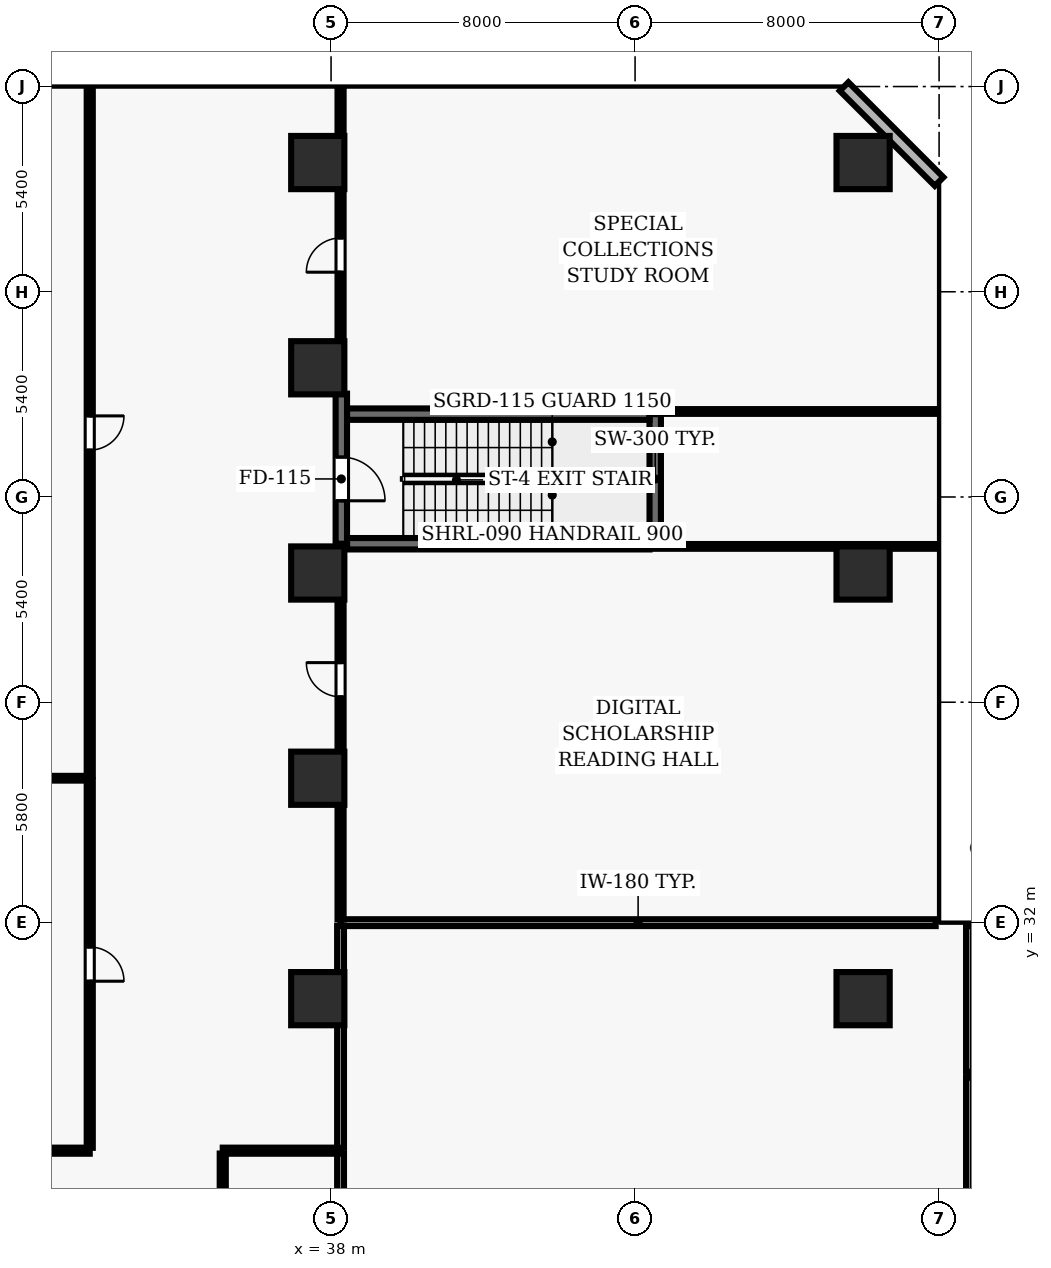
"""IFC4 building model, lengths in metres.
Left out: names, types, materials, properties, quantities, classifications, styles, units other than length and angle.
Written with IfcOpenShell. Run it as: python <this file> out.ifc"""

import sys

from ifc_helpers import new_model, si_unit, direction, frame, frame_2d, origin, origin_2d, place, context, subcontext, project, spatial, rectangle, extrude, element, fill, save


model = new_model("IFC4")
c1 = context("Model", 3, precision=1e-05, world=origin(), true_north=direction((0.0, 1.0)))
c2 = subcontext(c1, "Body", "Model", "MODEL_VIEW")
j1 = project(units=[si_unit("LENGTHUNIT", "METRE"), si_unit("PLANEANGLEUNIT", "RADIAN")], contexts=[c1])
p1 = place(None, origin())
s1 = spatial("IfcSite", under=j1, at=p1, CompositionType="ELEMENT")
p2 = place(p1, origin())
s2 = spatial("IfcBuilding", under=s1, at=p2, CompositionType="ELEMENT")
p3 = place(p2, frame((0.0, 0.0, 5.2)))
s3 = spatial("IfcBuildingStorey", under=s2, at=p3, CompositionType="ELEMENT", Elevation=5.2)
for number, where, z_axis, x_axis in (
    (1, (37.65, 30.0, 0.0), (0.0, 0.0, 1.0), (1.0, 0.0, 0.0)),
    (2, (37.65, 35.8, 0.0), (0.0, 0.0, 1.0), (1.0, 0.0, 0.0)),
    (3, (37.65, 41.2, 0.0), (0.0, 0.0, 1.0), (1.0, 0.0, 0.0)),
    (4, (37.65, 46.6, 0.0), (0.0, 0.0, 1.0), (1.0, 0.0, 0.0)),
    (5, (37.65, 52.0, 0.0), (0.0, 0.0, 1.0), (1.0, 0.0, 0.0)),
    (6, (52.0, 30.0, 0.0), (0.0, 0.0, 1.0), (1.0, 0.0, 0.0)),
    (7, (52.0, 41.2, 0.0), (0.0, 0.0, 1.0), (1.0, 0.0, 0.0)),
    (8, (52.0, 52.0, 0.0), (0.0, 0.0, 1.0), (1.0, 0.0, 0.0)),
):
    element("IfcColumn", number, at=place(p3, frame(where, z_axis=z_axis, x_axis=x_axis)), inside=s3, PredefinedType="COLUMN", context=c2, shape_type="SweptSolid", body=[
        extrude(rectangle(XDim=1.4, YDim=1.4, at=origin_2d()), origin(), (0.0, 0.0, 1.0), 5.2),
    ])
p4 = place(p3, frame((54.0, 51.5, 0.0), z_axis=(0.0, 0.0, 1.0), x_axis=(-0.707106781187, 0.707106781187, 0.0)))
e9 = element("IfcWall", 9, at=p4, inside=s3, PredefinedType="SOLIDWALL", context=c2, shape_type="SweptSolid", body=[
    extrude(rectangle(XDim=3.536, YDim=0.32, at=frame_2d((1.768, 0.0))), origin(), (0.0, 0.0, 1.0), 4.92),
])
p5 = place(p3, frame((38.42, 41.97, 0.0), z_axis=(0.0, 0.0, 1.0), x_axis=(1.0, 0.0, 0.0)))
e10 = element("IfcWall", 10, at=p5, inside=s3, PredefinedType="SHEAR", context=c2, shape_type="SweptSolid", body=[
    extrude(rectangle(XDim=7.96, YDim=0.3, at=frame_2d((3.98, 0.0))), origin(), (0.0, 0.0, 1.0), 4.92),
])
p6 = place(p3, frame((46.53, 41.97, 0.0), z_axis=(0.0, 0.0, 1.0), x_axis=(0.0, 1.0, 0.0)))
e11 = element("IfcWall", 11, at=p6, inside=s3, PredefinedType="SHEAR", context=c2, shape_type="SweptSolid", body=[
    extrude(rectangle(XDim=3.41, YDim=0.3, at=frame_2d((1.705, 0.0))), origin(), (0.0, 0.0, 1.0), 4.92),
])
p7 = place(p3, frame((46.38, 45.38, 0.0), z_axis=(0.0, 0.0, 1.0), x_axis=(-1.0, 0.0, 0.0)))
e12 = element("IfcWall", 12, at=p7, inside=s3, PredefinedType="SHEAR", context=c2, shape_type="SweptSolid", body=[
    extrude(rectangle(XDim=7.96, YDim=0.3, at=frame_2d((3.98, 0.0))), origin(), (0.0, 0.0, 1.0), 4.92),
])
p8 = place(p3, frame((38.27, 45.92, 0.0), z_axis=(0.0, 0.0, 1.0), x_axis=(0.0, -1.0, 0.0)))
e13 = element("IfcWall", 13, at=p8, inside=s3, PredefinedType="SHEAR", context=c2, shape_type="SweptSolid", body=[
    extrude(rectangle(XDim=3.95, YDim=0.3, at=frame_2d((1.975, 0.0))), origin(), (0.0, 0.0, 1.0), 4.92),
])
p9 = place(p8, frame((1.67, 0.0, 0.0)))
e14 = element("IfcOpeningElement", 14, at=p9, cuts=e13, PredefinedType="OPENING", context=c2, shape_type="SweptSolid", body=[
    extrude(rectangle(XDim=1.15, YDim=2.15, at=frame_2d((0.575, 1.075))), frame((0.0, 0.16, 0.0), z_axis=(0.0, -1.0, 0.0), x_axis=(1.0, 0.0, 0.0)), (0.0, 0.0, 1.0), 0.32),
])
p10 = place(p3, frame((31.65, 26.0, 0.0), z_axis=(0.0, 0.0, 1.0), x_axis=(-1.0, 0.0, 0.0)))
e15 = element("IfcWall", 15, at=p10, inside=s3, PredefinedType="PARTITIONING", context=c2, shape_type="SweptSolid", body=[
    extrude(rectangle(XDim=9.495, YDim=0.16, at=frame_2d((4.748, 0.0))), origin(), (0.0, 0.0, 1.0), 4.92),
])
p11 = place(p3, frame((31.65, 35.8, 0.0), z_axis=(0.0, 0.0, 1.0), x_axis=(-1.0, 0.0, 0.0)))
e16 = element("IfcWall", 16, at=p11, inside=s3, PredefinedType="PARTITIONING", context=c2, shape_type="SweptSolid", body=[
    extrude(rectangle(XDim=9.495, YDim=0.125, at=frame_2d((4.748, 0.0))), origin(), (0.0, 0.0, 1.0), 3.72),
])
p12 = place(p3, frame((35.15, 26.0, 0.0), z_axis=(0.0, 0.0, 1.0), x_axis=(1.0, 0.0, 0.0)))
e17 = element("IfcWall", 17, at=p12, inside=s3, PredefinedType="PARTITIONING", context=c2, shape_type="SweptSolid", body=[
    extrude(rectangle(XDim=3.1, YDim=0.16, at=frame_2d((1.55, 0.0))), origin(), (0.0, 0.0, 1.0), 4.92),
])
p13 = place(p3, frame((38.25, 32.0, 0.0), z_axis=(0.0, 0.0, 1.0), x_axis=(1.0, 0.0, 0.0)))
e18 = element("IfcWall", 18, at=p13, inside=s3, PredefinedType="PARTITIONING", context=c2, shape_type="SweptSolid", body=[
    extrude(rectangle(XDim=15.66, YDim=0.18, at=frame_2d((7.83, 0.0))), origin(), (0.0, 0.0, 1.0), 4.92),
])
for number, where, z_axis, x_axis in (
    (19, (46.38, 45.45, 0.0), (0.0, 0.0, 1.0), (1.0, 0.0, 0.0)),
    (20, (53.91, 41.9, 0.0), (0.0, 0.0, 1.0), (-1.0, 0.0, 0.0)),
):
    element("IfcWall", number, at=place(p3, frame(where, z_axis=z_axis, x_axis=x_axis)), inside=s3, PredefinedType="PARTITIONING", context=c2, shape_type="SweptSolid", body=[
        extrude(rectangle(XDim=7.53, YDim=0.125, at=frame_2d((3.765, 0.0))), origin(), (0.0, 0.0, 1.0), 4.92),
    ])
p14 = place(p3, frame((58.45, 28.0, 0.0), z_axis=(0.0, 0.0, 1.0), x_axis=(-1.0, 0.0, 0.0)))
e21 = element("IfcWall", 21, at=p14, inside=s3, PredefinedType="PARTITIONING", context=c2, shape_type="SweptSolid", body=[
    extrude(rectangle(XDim=3.65, YDim=0.16, at=frame_2d((1.825, 0.0))), origin(), (0.0, 0.0, 1.0), 4.92),
])
p15 = place(p3, frame((31.65, 35.742, 0.0), z_axis=(0.0, 0.0, 1.0), x_axis=(0.0, -1.0, 0.0)))
e22 = element("IfcWall", 22, at=p15, inside=s3, PredefinedType="PARTITIONING", context=c2, shape_type="SweptSolid", body=[
    extrude(rectangle(XDim=9.667, YDim=0.16, at=frame_2d((4.833, 0.0))), origin(), (0.0, 0.0, 1.0), 4.92),
])
p16 = place(p15, frame((4.383, 0.0, 0.0)))
e23 = element("IfcOpeningElement", 23, at=p16, cuts=e22, PredefinedType="OPENING", context=c2, shape_type="SweptSolid", body=[
    extrude(rectangle(XDim=0.9, YDim=2.1, at=frame_2d((0.45, 1.05))), frame((0.0, 0.09, 0.0), z_axis=(0.0, -1.0, 0.0), x_axis=(1.0, 0.0, 0.0)), (0.0, 0.0, 1.0), 0.18),
])
p17 = place(p3, frame((31.65, 53.91, 0.0), z_axis=(0.0, 0.0, 1.0), x_axis=(0.0, -1.0, 0.0)))
e24 = element("IfcWall", 24, at=p17, inside=s3, PredefinedType="PARTITIONING", context=c2, shape_type="SweptSolid", body=[
    extrude(rectangle(XDim=18.053, YDim=0.16, at=frame_2d((9.026, 0.0))), origin(), (0.0, 0.0, 1.0), 4.92),
])
p18 = place(p17, frame((8.576, 0.0, 0.0)))
e25 = element("IfcOpeningElement", 25, at=p18, cuts=e24, PredefinedType="OPENING", context=c2, shape_type="SweptSolid", body=[
    extrude(rectangle(XDim=0.9, YDim=2.1, at=frame_2d((0.45, 1.05))), frame((0.0, 0.09, 0.0), z_axis=(0.0, -1.0, 0.0), x_axis=(1.0, 0.0, 0.0)), (0.0, 0.0, 1.0), 0.18),
])
p19 = place(p3, frame((35.15, 24.07, 0.0), z_axis=(0.0, 0.0, 1.0), x_axis=(0.0, 1.0, 0.0)))
e26 = element("IfcWall", 26, at=p19, inside=s3, PredefinedType="PARTITIONING", context=c2, shape_type="SweptSolid", body=[
    extrude(rectangle(XDim=1.855, YDim=0.16, at=frame_2d((0.927, 0.0))), origin(), (0.0, 0.0, 1.0), 4.92),
])
p20 = place(p3, frame((38.25, 25.925, 0.0), z_axis=(0.0, 0.0, 1.0), x_axis=(0.0, -1.0, 0.0)))
e27 = element("IfcWall", 27, at=p20, inside=s3, PredefinedType="PARTITIONING", context=c2, shape_type="SweptSolid", body=[
    extrude(rectangle(XDim=10.64, YDim=0.18, at=frame_2d((5.32, 0.0))), origin(), (0.0, 0.0, 1.0), 4.92),
])
p21 = place(p3, frame((38.25, 26.075, 0.0), z_axis=(0.0, 0.0, 1.0), x_axis=(0.0, 1.0, 0.0)))
e28 = element("IfcWall", 28, at=p21, inside=s3, PredefinedType="PARTITIONING", context=c2, shape_type="SweptSolid", body=[
    extrude(rectangle(XDim=5.84, YDim=0.18, at=frame_2d((2.92, 0.0))), origin(), (0.0, 0.0, 1.0), 4.92),
])
p22 = place(p3, frame((38.25, 32.085, 0.0), z_axis=(0.0, 0.0, 1.0), x_axis=(0.0, 1.0, 0.0)))
e29 = element("IfcWall", 29, at=p22, inside=s3, PredefinedType="PARTITIONING", context=c2, shape_type="SweptSolid", body=[
    extrude(rectangle(XDim=9.815, YDim=0.16, at=frame_2d((4.907, 0.0))), origin(), (0.0, 0.0, 1.0), 4.92),
])
p23 = place(p22, frame((5.857, 0.0, 0.0)))
e30 = element("IfcOpeningElement", 30, at=p23, cuts=e29, PredefinedType="OPENING", context=c2, shape_type="SweptSolid", body=[
    extrude(rectangle(XDim=0.9, YDim=2.1, at=frame_2d((0.45, 1.05))), frame((0.0, 0.09, 0.0), z_axis=(0.0, -1.0, 0.0), x_axis=(1.0, 0.0, 0.0)), (0.0, 0.0, 1.0), 0.18),
])
p24 = place(p3, frame((38.25, 45.92, 0.0), z_axis=(0.0, 0.0, 1.0), x_axis=(0.0, 1.0, 0.0)))
e31 = element("IfcWall", 31, at=p24, inside=s3, PredefinedType="PARTITIONING", context=c2, shape_type="SweptSolid", body=[
    extrude(rectangle(XDim=7.99, YDim=0.16, at=frame_2d((3.995, 0.0))), origin(), (0.0, 0.0, 1.0), 4.92),
])
p25 = place(p24, frame((3.195, 0.0, 0.0)))
e32 = element("IfcOpeningElement", 32, at=p25, cuts=e31, PredefinedType="OPENING", context=c2, shape_type="SweptSolid", body=[
    extrude(rectangle(XDim=0.9, YDim=2.1, at=frame_2d((0.45, 1.05))), frame((0.0, 0.09, 0.0), z_axis=(0.0, -1.0, 0.0), x_axis=(1.0, 0.0, 0.0)), (0.0, 0.0, 1.0), 0.18),
])
p26 = place(p3, frame((54.8, 28.075, 0.0), z_axis=(0.0, 0.0, 1.0), x_axis=(0.0, 1.0, 0.0)))
e33 = element("IfcWall", 33, at=p26, inside=s3, PredefinedType="PARTITIONING", context=c2, shape_type="SweptSolid", body=[
    extrude(rectangle(XDim=3.835, YDim=0.18, at=frame_2d((1.917, 0.0))), origin(), (0.0, 0.0, 1.0), 4.451),
])
p27 = place(p3, frame((54.8, 27.925, 0.0), z_axis=(0.0, 0.0, 1.0), x_axis=(0.0, -1.0, 0.0)))
e34 = element("IfcWall", 34, at=p27, inside=s3, PredefinedType="PARTITIONING", context=c2, shape_type="SweptSolid", body=[
    extrude(rectangle(XDim=12.64, YDim=0.18, at=frame_2d((6.32, 0.0))), origin(), (0.0, 0.0, 1.0), 4.451),
])
p28 = place(p27, frame((5.57, 0.0, 0.0)))
e35 = element("IfcOpeningElement", 35, at=p28, cuts=e34, PredefinedType="OPENING", context=c2, shape_type="SweptSolid", body=[
    extrude(rectangle(XDim=1.5, YDim=2.2, at=frame_2d((0.75, 1.1))), frame((0.0, 0.1, 0.0), z_axis=(0.0, -1.0, 0.0), x_axis=(1.0, 0.0, 0.0)), (0.0, 0.0, 1.0), 0.2),
])
p29 = place(p9, origin())
e36 = element("IfcDoor", 36, at=p29, inside=s3, OperationType="SINGLE_SWING_RIGHT", PredefinedType="DOOR", context=c2, shape_type="SweptSolid", body=[
    extrude(rectangle(XDim=1.15, YDim=2.15, at=frame_2d((0.575, 1.075))), frame((0.0, 0.025, 0.0), z_axis=(0.0, -1.0, 0.0), x_axis=(1.0, 0.0, 0.0)), (0.0, 0.0, 1.0), 0.05),
])
fill(e14, e36)
p30 = place(p16, origin())
e37 = element("IfcDoor", 37, at=p30, inside=s3, OperationType="SINGLE_SWING_RIGHT", PredefinedType="DOOR", context=c2, shape_type="SweptSolid", body=[
    extrude(rectangle(XDim=0.9, YDim=2.1, at=frame_2d((0.45, 1.05))), frame((0.0, 0.025, 0.0), z_axis=(0.0, -1.0, 0.0), x_axis=(1.0, 0.0, 0.0)), (0.0, 0.0, 1.0), 0.05),
])
fill(e23, e37)
p31 = place(p18, origin())
e38 = element("IfcDoor", 38, at=p31, inside=s3, OperationType="SINGLE_SWING_LEFT", PredefinedType="DOOR", context=c2, shape_type="SweptSolid", body=[
    extrude(rectangle(XDim=0.9, YDim=2.1, at=frame_2d((0.45, 1.05))), frame((0.0, 0.025, 0.0), z_axis=(0.0, -1.0, 0.0), x_axis=(1.0, 0.0, 0.0)), (0.0, 0.0, 1.0), 0.05),
])
fill(e25, e38)
p32 = place(p23, origin())
e39 = element("IfcDoor", 39, at=p32, inside=s3, OperationType="SINGLE_SWING_RIGHT", PredefinedType="DOOR", context=c2, shape_type="SweptSolid", body=[
    extrude(rectangle(XDim=0.9, YDim=2.1, at=frame_2d((0.45, 1.05))), frame((0.0, 0.025, 0.0), z_axis=(0.0, -1.0, 0.0), x_axis=(1.0, 0.0, 0.0)), (0.0, 0.0, 1.0), 0.05),
])
fill(e30, e39)
p33 = place(p25, origin())
e40 = element("IfcDoor", 40, at=p33, inside=s3, OperationType="SINGLE_SWING_LEFT", PredefinedType="DOOR", context=c2, shape_type="SweptSolid", body=[
    extrude(rectangle(XDim=0.9, YDim=2.1, at=frame_2d((0.45, 1.05))), frame((0.0, 0.025, 0.0), z_axis=(0.0, -1.0, 0.0), x_axis=(1.0, 0.0, 0.0)), (0.0, 0.0, 1.0), 0.05),
])
fill(e32, e40)
save(model, sys.argv[1])
